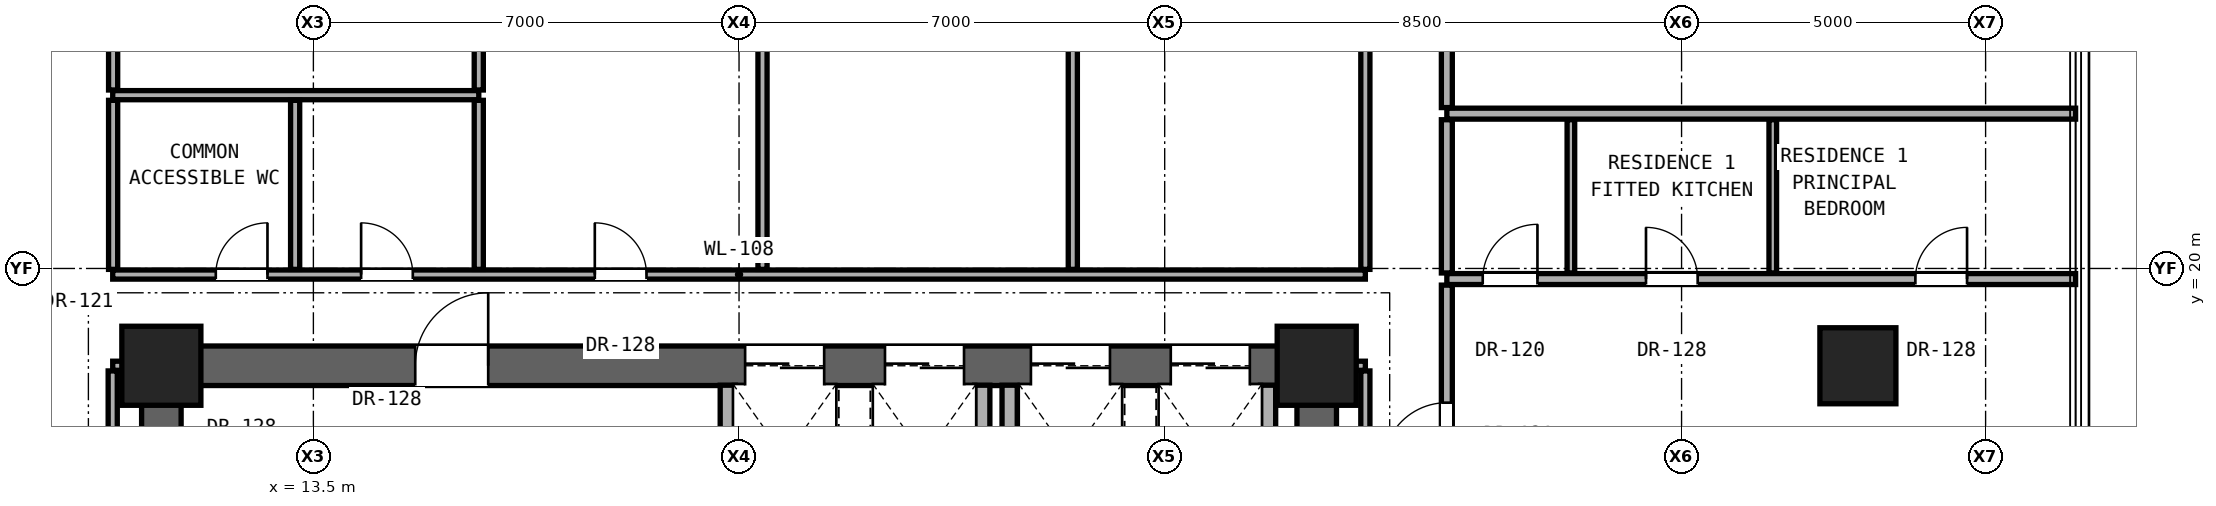
"""IFC4 building model, lengths in metres.
Left out: names, types, materials, properties, quantities, classifications, styles, units other than length and angle.
Written with IfcOpenShell. Run it as: python <this file> out.ifc"""

import sys

from ifc_helpers import new_model, si_unit, direction, frame, frame_2d, origin, origin_2d, place, context, subcontext, project, spatial, rectangle, hollow_rectangle, extrude, element, fill, save


model = new_model("IFC4")
c1 = context("Model", 3, precision=1e-05, world=origin(), true_north=direction((0.0, 1.0)))
c2 = subcontext(c1, "Body", "Model", "MODEL_VIEW")
j1 = project(units=[si_unit("LENGTHUNIT", "METRE"), si_unit("PLANEANGLEUNIT", "RADIAN")], contexts=[c1])
p1 = place(None, origin())
s1 = spatial("IfcSite", under=j1, at=p1, CompositionType="ELEMENT")
p2 = place(p1, origin())
s2 = spatial("IfcBuilding", under=s1, at=p2, CompositionType="ELEMENT")
p3 = place(p2, frame((0.0, 0.0, 68.6)))
s3 = spatial("IfcBuildingStorey", under=s2, at=p3, CompositionType="ELEMENT", Elevation=68.6)
for number, where, z_axis, x_axis in (
    (1, (11.0, 18.4, 0.0), (0.0, 0.0, 1.0), (1.0, 0.0, 0.0)),
    (2, (30.0, 18.4, 0.0), (0.0, 0.0, 1.0), (1.0, 0.0, 0.0)),
):
    element("IfcColumn", number, at=place(p3, frame(where, z_axis=z_axis, x_axis=x_axis)), inside=s3, PredefinedType="COLUMN", context=c2, shape_type="SweptSolid", body=[
        extrude(rectangle(XDim=1.3, YDim=1.3, at=origin_2d()), origin(), (0.0, 0.0, 1.0), 3.3),
    ])
p4 = place(p3, frame((38.9, 18.4, 0.0), z_axis=(0.0, 0.0, 1.0), x_axis=(1.0, 0.0, 0.0)))
e3 = element("IfcColumn", 3, at=p4, inside=s3, PredefinedType="COLUMN", context=c2, shape_type="SweptSolid", body=[
    extrude(hollow_rectangle(XDim=1.25, YDim=1.25, WallThickness=0.07, at=origin_2d()), origin(), (0.0, 0.0, 1.0), 3.3),
])
for number, where, z_axis, x_axis in (
    (4, (11.0, 12.4, 0.0), (0.0, 0.0, 1.0), (0.0, 1.0, 0.0)),
    (5, (30.0, 12.4, 0.0), (0.0, 0.0, 1.0), (0.0, 1.0, 0.0)),
):
    element("IfcWall", number, at=place(p3, frame(where, z_axis=z_axis, x_axis=x_axis)), inside=s3, PredefinedType="SHEAR", context=c2, shape_type="SweptSolid", body=[
        extrude(rectangle(XDim=6.0, YDim=0.65, at=frame_2d((3.0, 0.0))), origin(), (0.0, 0.0, 1.0), 3.06),
    ])
p5 = place(p3, frame((11.0, 18.4, 0.0), z_axis=(0.0, 0.0, 1.0), x_axis=(1.0, 0.0, 0.0)))
e6 = element("IfcWall", 6, at=p5, inside=s3, PredefinedType="SHEAR", context=c2, shape_type="SweptSolid", body=[
    extrude(rectangle(XDim=19.0, YDim=0.65, at=frame_2d((9.5, 0.0))), origin(), (0.0, 0.0, 1.0), 3.06),
])
p6 = place(p5, frame((4.175, 0.0, 0.0)))
e7 = element("IfcOpeningElement", 7, at=p6, cuts=e6, PredefinedType="OPENING", context=c2, shape_type="SweptSolid", body=[
    extrude(rectangle(XDim=1.2, YDim=2.25, at=frame_2d((0.6, 1.125))), frame((0.0, 0.335, 0.0), z_axis=(0.0, -1.0, 0.0), x_axis=(1.0, 0.0, 0.0)), (0.0, 0.0, 1.0), 0.67),
])
p7 = place(p5, frame((9.6, 0.0, 0.0)))
e8 = element("IfcOpeningElement", 8, at=p7, cuts=e6, PredefinedType="OPENING", context=c2, shape_type="SweptSolid", body=[
    extrude(rectangle(XDim=1.3, YDim=2.3, at=frame_2d((0.65, 1.15))), frame((0.0, 0.335, 0.0), z_axis=(0.0, -1.0, 0.0), x_axis=(1.0, 0.0, 0.0)), (0.0, 0.0, 1.0), 0.67),
])
p8 = place(p5, frame((11.9, 0.0, 0.0)))
e9 = element("IfcOpeningElement", 9, at=p8, cuts=e6, PredefinedType="OPENING", context=c2, shape_type="SweptSolid", body=[
    extrude(rectangle(XDim=1.3, YDim=2.3, at=frame_2d((0.65, 1.15))), frame((0.0, 0.335, 0.0), z_axis=(0.0, -1.0, 0.0), x_axis=(1.0, 0.0, 0.0)), (0.0, 0.0, 1.0), 0.67),
])
p9 = place(p5, frame((14.3, 0.0, 0.0)))
e10 = element("IfcOpeningElement", 10, at=p9, cuts=e6, PredefinedType="OPENING", context=c2, shape_type="SweptSolid", body=[
    extrude(rectangle(XDim=1.3, YDim=2.3, at=frame_2d((0.65, 1.15))), frame((0.0, 0.335, 0.0), z_axis=(0.0, -1.0, 0.0), x_axis=(1.0, 0.0, 0.0)), (0.0, 0.0, 1.0), 0.67),
])
p10 = place(p5, frame((16.6, 0.0, 0.0)))
e11 = element("IfcOpeningElement", 11, at=p10, cuts=e6, PredefinedType="OPENING", context=c2, shape_type="SweptSolid", body=[
    extrude(rectangle(XDim=1.3, YDim=2.3, at=frame_2d((0.65, 1.15))), frame((0.0, 0.335, 0.0), z_axis=(0.0, -1.0, 0.0), x_axis=(1.0, 0.0, 0.0)), (0.0, 0.0, 1.0), 0.67),
])
for number, where, z_axis, x_axis in (
    (12, (10.2, 18.4, 0.0), (0.0, 0.0, 1.0), (1.0, 0.0, 0.0)),
    (13, (30.32, 18.4, 0.0), (0.0, 0.0, 1.0), (1.0, 0.0, 0.0)),
):
    element("IfcWall", number, at=place(p3, frame(where, z_axis=z_axis, x_axis=x_axis)), inside=s3, PredefinedType="PARTITIONING", context=c2, shape_type="SweptSolid", body=[
        extrude(rectangle(XDim=0.48, YDim=0.15, at=frame_2d((0.24, 0.0))), origin(), (0.0, 0.0, 1.0), 2.436),
    ])
p11 = place(p3, frame((10.2, 19.9, 0.0), z_axis=(0.0, 0.0, 1.0), x_axis=(1.0, 0.0, 0.0)))
e14 = element("IfcWall", 14, at=p11, inside=s3, PredefinedType="PARTITIONING", context=c2, shape_type="SweptSolid", body=[
    extrude(rectangle(XDim=20.6, YDim=0.15, at=frame_2d((10.3, 0.0))), origin(), (0.0, 0.0, 1.0), 2.104),
])
p12 = place(p11, frame((1.695, 0.0, 0.0)))
e15 = element("IfcOpeningElement", 15, at=p12, cuts=e14, PredefinedType="OPENING", context=c2, shape_type="SweptSolid", body=[
    extrude(rectangle(XDim=0.85, YDim=2.01, at=frame_2d((0.425, 1.005))), frame((0.0, 0.085, 0.0), z_axis=(0.0, -1.0, 0.0), x_axis=(1.0, 0.0, 0.0)), (0.0, 0.0, 1.0), 0.17),
])
p13 = place(p11, frame((4.085, 0.0, 0.0)))
e16 = element("IfcOpeningElement", 16, at=p13, cuts=e14, PredefinedType="OPENING", context=c2, shape_type="SweptSolid", body=[
    extrude(rectangle(XDim=0.85, YDim=2.01, at=frame_2d((0.425, 1.005))), frame((0.0, 0.085, 0.0), z_axis=(0.0, -1.0, 0.0), x_axis=(1.0, 0.0, 0.0)), (0.0, 0.0, 1.0), 0.17),
])
p14 = place(p11, frame((7.928, 0.0, 0.0)))
e17 = element("IfcOpeningElement", 17, at=p14, cuts=e14, PredefinedType="OPENING", context=c2, shape_type="SweptSolid", body=[
    extrude(rectangle(XDim=0.85, YDim=2.01, at=frame_2d((0.425, 1.005))), frame((0.0, 0.085, 0.0), z_axis=(0.0, -1.0, 0.0), x_axis=(1.0, 0.0, 0.0)), (0.0, 0.0, 1.0), 0.17),
])
p15 = place(p3, frame((32.14, 19.826, 0.0), z_axis=(0.0, 0.0, 1.0), x_axis=(1.0, 0.0, 0.0)))
e18 = element("IfcWall", 18, at=p15, inside=s3, PredefinedType="PARTITIONING", context=c2, shape_type="SweptSolid", body=[
    extrude(rectangle(XDim=10.34, YDim=0.18, at=frame_2d((5.17, 0.0))), origin(), (0.0, 0.0, 1.0), 2.125),
])
p16 = place(p15, frame((7.705, 0.0, 0.0)))
e19 = element("IfcOpeningElement", 19, at=p16, cuts=e18, PredefinedType="OPENING", context=c2, shape_type="SweptSolid", body=[
    extrude(rectangle(XDim=0.85, YDim=2.01, at=frame_2d((0.425, 1.005))), frame((0.0, 0.1, 0.0), z_axis=(0.0, -1.0, 0.0), x_axis=(1.0, 0.0, 0.0)), (0.0, 0.0, 1.0), 0.2),
])
p17 = place(p15, frame((3.275, 0.0, 0.0)))
e20 = element("IfcOpeningElement", 20, at=p17, cuts=e18, PredefinedType="OPENING", context=c2, shape_type="SweptSolid", body=[
    extrude(rectangle(XDim=0.85, YDim=2.01, at=frame_2d((0.425, 1.005))), frame((0.0, 0.1, 0.0), z_axis=(0.0, -1.0, 0.0), x_axis=(1.0, 0.0, 0.0)), (0.0, 0.0, 1.0), 0.2),
])
p18 = place(p15, frame((0.59, 0.0, 0.0)))
e21 = element("IfcOpeningElement", 21, at=p18, cuts=e18, PredefinedType="OPENING", context=c2, shape_type="SweptSolid", body=[
    extrude(rectangle(XDim=0.9, YDim=2.1, at=frame_2d((0.45, 1.05))), frame((0.0, 0.1, 0.0), z_axis=(0.0, -1.0, 0.0), x_axis=(1.0, 0.0, 0.0)), (0.0, 0.0, 1.0), 0.2),
])
p19 = place(p3, frame((32.14, 22.546, 0.0), z_axis=(0.0, 0.0, 1.0), x_axis=(1.0, 0.0, 0.0)))
e22 = element("IfcWall", 22, at=p19, inside=s3, PredefinedType="PARTITIONING", context=c2, shape_type="SweptSolid", body=[
    extrude(rectangle(XDim=10.34, YDim=0.18, at=frame_2d((5.17, 0.0))), origin(), (0.0, 0.0, 1.0), 2.125),
])
p20 = place(p3, frame((10.2, 22.85, 0.0), z_axis=(0.0, 0.0, 1.0), x_axis=(1.0, 0.0, 0.0)))
e23 = element("IfcWall", 23, at=p20, inside=s3, PredefinedType="PARTITIONING", context=c2, shape_type="SweptSolid", body=[
    extrude(rectangle(XDim=6.02, YDim=0.15, at=frame_2d((3.01, 0.0))), origin(), (0.0, 0.0, 1.0), 2.104),
])
p21 = place(p3, frame((10.2, 12.335, 0.0), z_axis=(0.0, 0.0, 1.0), x_axis=(0.0, 1.0, 0.0)))
e24 = element("IfcWall", 24, at=p21, inside=s3, PredefinedType="PARTITIONING", context=c2, shape_type="SweptSolid", body=[
    extrude(rectangle(XDim=5.98, YDim=0.15, at=frame_2d((2.99, 0.0))), origin(), (0.0, 0.0, 1.0), 2.436),
])
p22 = place(p3, frame((10.207, 19.985, 0.0), z_axis=(0.0, 0.0, 1.0), x_axis=(0.0, 1.0, 0.0)))
e25 = element("IfcWall", 25, at=p22, inside=s3, PredefinedType="PARTITIONING", context=c2, shape_type="SweptSolid", body=[
    extrude(rectangle(XDim=2.78, YDim=0.15, at=frame_2d((1.39, 0.0))), origin(), (0.0, 0.0, 1.0), 3.06),
])
p23 = place(p3, frame((10.207, 22.935, 0.0), z_axis=(0.0, 0.0, 1.0), x_axis=(0.0, 1.0, 0.0)))
e26 = element("IfcWall", 26, at=p23, inside=s3, PredefinedType="PARTITIONING", context=c2, shape_type="SweptSolid", body=[
    extrude(rectangle(XDim=10.08, YDim=0.15, at=frame_2d((5.04, 0.0))), origin(), (0.0, 0.0, 1.0), 2.279),
])
p24 = place(p23, frame((4.565, 0.0, 0.0)))
e27 = element("IfcOpeningElement", 27, at=p24, cuts=e26, PredefinedType="OPENING", context=c2, shape_type="SweptSolid", body=[
    extrude(rectangle(XDim=0.95, YDim=2.15, at=frame_2d((0.475, 1.075))), frame((0.0, 0.085, 0.0), z_axis=(0.0, -1.0, 0.0), x_axis=(1.0, 0.0, 0.0)), (0.0, 0.0, 1.0), 0.17),
])
for number, where, z_axis, x_axis in (
    (28, (13.2, 19.985, 0.0), (0.0, 0.0, 1.0), (0.0, 1.0, 0.0)),
    (29, (16.22, 19.985, 0.0), (0.0, 0.0, 1.0), (0.0, 1.0, 0.0)),
):
    element("IfcWall", number, at=place(p3, frame(where, z_axis=z_axis, x_axis=x_axis)), inside=s3, PredefinedType="PARTITIONING", context=c2, shape_type="SweptSolid", body=[
        extrude(rectangle(XDim=2.78, YDim=0.15, at=frame_2d((1.39, 0.0))), origin(), (0.0, 0.0, 1.0), 3.06),
    ])
p25 = place(p3, frame((16.22, 22.935, 0.0), z_axis=(0.0, 0.0, 1.0), x_axis=(0.0, 1.0, 0.0)))
e30 = element("IfcWall", 30, at=p25, inside=s3, PredefinedType="PARTITIONING", context=c2, shape_type="SweptSolid", body=[
    extrude(rectangle(XDim=10.08, YDim=0.15, at=frame_2d((5.04, 0.0))), origin(), (0.0, 0.0, 1.0), 2.104),
])
p26 = place(p3, frame((20.315, 16.555, 0.0), z_axis=(0.0, 0.0, 1.0), x_axis=(0.0, 1.0, 0.0)))
e31 = element("IfcWall", 31, at=p26, inside=s3, PredefinedType="SOLIDWALL", context=c2, shape_type="SweptSolid", body=[
    extrude(rectangle(XDim=1.525, YDim=0.25, at=frame_2d((0.763, 0.0))), origin(), (0.0, 0.0, 1.0), 3.06),
])
p27 = place(p3, frame((20.886, 19.985, 0.0), z_axis=(0.0, 0.0, 1.0), x_axis=(0.0, 1.0, 0.0)))
e32 = element("IfcWall", 32, at=p27, inside=s3, PredefinedType="PARTITIONING", context=c2, shape_type="SweptSolid", body=[
    extrude(rectangle(XDim=13.03, YDim=0.15, at=frame_2d((6.515, 0.0))), origin(), (0.0, 0.0, 1.0), 2.104),
])
for number, where, z_axis, x_axis in (
    (33, (24.5, 15.785, 0.0), (0.0, 0.0, 1.0), (0.0, 1.0, 0.0)),
    (34, (24.95, 15.785, 0.0), (0.0, 0.0, 1.0), (0.0, 1.0, 0.0)),
):
    element("IfcWall", number, at=place(p3, frame(where, z_axis=z_axis, x_axis=x_axis)), inside=s3, PredefinedType="SOLIDWALL", context=c2, shape_type="SweptSolid", body=[
        extrude(rectangle(XDim=2.295, YDim=0.25, at=frame_2d((1.147, 0.0))), origin(), (0.0, 0.0, 1.0), 3.06),
    ])
p28 = place(p3, frame((25.989, 19.985, 0.0), z_axis=(0.0, 0.0, 1.0), x_axis=(0.0, 1.0, 0.0)))
e35 = element("IfcWall", 35, at=p28, inside=s3, PredefinedType="PARTITIONING", context=c2, shape_type="SweptSolid", body=[
    extrude(rectangle(XDim=13.03, YDim=0.15, at=frame_2d((6.515, 0.0))), origin(), (0.0, 0.0, 1.0), 2.104),
])
p29 = place(p3, frame((29.2, 15.785, 0.0), z_axis=(0.0, 0.0, 1.0), x_axis=(0.0, 1.0, 0.0)))
e36 = element("IfcWall", 36, at=p29, inside=s3, PredefinedType="SOLIDWALL", context=c2, shape_type="SweptSolid", body=[
    extrude(rectangle(XDim=2.295, YDim=0.25, at=frame_2d((1.147, 0.0))), origin(), (0.0, 0.0, 1.0), 3.06),
])
p30 = place(p3, frame((30.8, 12.335, 0.0), z_axis=(0.0, 0.0, 1.0), x_axis=(0.0, 1.0, 0.0)))
e37 = element("IfcWall", 37, at=p30, inside=s3, PredefinedType="PARTITIONING", context=c2, shape_type="SweptSolid", body=[
    extrude(rectangle(XDim=5.98, YDim=0.15, at=frame_2d((2.99, 0.0))), origin(), (0.0, 0.0, 1.0), 2.436),
])
p31 = place(p3, frame((30.8, 19.985, 0.0), z_axis=(0.0, 0.0, 1.0), x_axis=(0.0, 1.0, 0.0)))
e38 = element("IfcWall", 38, at=p31, inside=s3, PredefinedType="PARTITIONING", context=c2, shape_type="SweptSolid", body=[
    extrude(rectangle(XDim=13.03, YDim=0.15, at=frame_2d((6.515, 0.0))), origin(), (0.0, 0.0, 1.0), 2.279),
])
p32 = place(p3, frame((32.14, 14.21, 0.0), z_axis=(0.0, 0.0, 1.0), x_axis=(0.0, 1.0, 0.0)))
e39 = element("IfcWall", 39, at=p32, inside=s3, PredefinedType="PARTITIONING", context=c2, shape_type="SweptSolid", body=[
    extrude(rectangle(XDim=5.516, YDim=0.18, at=frame_2d((2.758, 0.0))), origin(), (0.0, 0.0, 1.0), 2.436),
])
p33 = place(p32, frame((2.533, 0.0, 0.0)))
e40 = element("IfcOpeningElement", 40, at=p33, cuts=e39, PredefinedType="OPENING", context=c2, shape_type="SweptSolid", body=[
    extrude(rectangle(XDim=1.05, YDim=2.2, at=frame_2d((0.525, 1.1))), frame((0.0, 0.1, 0.0), z_axis=(0.0, -1.0, 0.0), x_axis=(1.0, 0.0, 0.0)), (0.0, 0.0, 1.0), 0.2),
])
p34 = place(p3, frame((32.14, 19.926, 0.0), z_axis=(0.0, 0.0, 1.0), x_axis=(0.0, 1.0, 0.0)))
e41 = element("IfcWall", 41, at=p34, inside=s3, PredefinedType="PARTITIONING", context=c2, shape_type="SweptSolid", body=[
    extrude(rectangle(XDim=2.52, YDim=0.18, at=frame_2d((1.26, 0.0))), origin(), (0.0, 0.0, 1.0), 3.06),
])
p35 = place(p3, frame((32.14, 22.646, 0.0), z_axis=(0.0, 0.0, 1.0), x_axis=(0.0, 1.0, 0.0)))
e42 = element("IfcWall", 42, at=p35, inside=s3, PredefinedType="PARTITIONING", context=c2, shape_type="SweptSolid", body=[
    extrude(rectangle(XDim=4.902, YDim=0.18, at=frame_2d((2.451, 0.0))), origin(), (0.0, 0.0, 1.0), 2.279),
])
p36 = place(p35, frame((1.926, 0.0, 0.0)))
e43 = element("IfcOpeningElement", 43, at=p36, cuts=e42, PredefinedType="OPENING", context=c2, shape_type="SweptSolid", body=[
    extrude(rectangle(XDim=1.05, YDim=2.2, at=frame_2d((0.525, 1.1))), frame((0.0, 0.1, 0.0), z_axis=(0.0, -1.0, 0.0), x_axis=(1.0, 0.0, 0.0)), (0.0, 0.0, 1.0), 0.2),
])
for number, where, z_axis, x_axis in (
    (44, (34.18, 19.926, 0.0), (0.0, 0.0, 1.0), (0.0, 1.0, 0.0)),
    (45, (37.5, 19.926, 0.0), (0.0, 0.0, 1.0), (0.0, 1.0, 0.0)),
):
    element("IfcWall", number, at=place(p3, frame(where, z_axis=z_axis, x_axis=x_axis)), inside=s3, PredefinedType="PARTITIONING", context=c2, shape_type="SweptSolid", body=[
        extrude(rectangle(XDim=2.52, YDim=0.125, at=frame_2d((1.26, 0.0))), origin(), (0.0, 0.0, 1.0), 3.06),
    ])
p37 = place(p6, origin())
e46 = element("IfcDoor", 46, at=p37, inside=s3, OperationType="SINGLE_SWING_RIGHT", PredefinedType="DOOR", context=c2, shape_type="SweptSolid", body=[
    extrude(rectangle(XDim=1.2, YDim=2.25, at=frame_2d((0.6, 1.125))), frame((0.0, 0.025, 0.0), z_axis=(0.0, -1.0, 0.0), x_axis=(1.0, 0.0, 0.0)), (0.0, 0.0, 1.0), 0.05),
])
fill(e7, e46)
p38 = place(p12, origin())
e47 = element("IfcDoor", 47, at=p38, inside=s3, OperationType="SINGLE_SWING_RIGHT", PredefinedType="DOOR", context=c2, shape_type="SweptSolid", body=[
    extrude(rectangle(XDim=0.85, YDim=2.01, at=frame_2d((0.425, 1.005))), frame((0.0, 0.025, 0.0), z_axis=(0.0, -1.0, 0.0), x_axis=(1.0, 0.0, 0.0)), (0.0, 0.0, 1.0), 0.05),
])
fill(e15, e47)
p39 = place(p33, origin())
e48 = element("IfcDoor", 48, at=p39, inside=s3, OperationType="SINGLE_SWING_LEFT", PredefinedType="DOOR", context=c2, shape_type="SweptSolid", body=[
    extrude(rectangle(XDim=1.05, YDim=2.2, at=frame_2d((0.525, 1.1))), frame((0.0, 0.025, 0.0), z_axis=(0.0, -1.0, 0.0), x_axis=(1.0, 0.0, 0.0)), (0.0, 0.0, 1.0), 0.05),
])
fill(e40, e48)
p40 = place(p16, origin())
e49 = element("IfcDoor", 49, at=p40, inside=s3, OperationType="SINGLE_SWING_RIGHT", PredefinedType="DOOR", context=c2, shape_type="SweptSolid", body=[
    extrude(rectangle(XDim=0.85, YDim=2.01, at=frame_2d((0.425, 1.005))), frame((0.0, 0.025, 0.0), z_axis=(0.0, -1.0, 0.0), x_axis=(1.0, 0.0, 0.0)), (0.0, 0.0, 1.0), 0.05),
])
fill(e19, e49)
p41 = place(p17, origin())
e50 = element("IfcDoor", 50, at=p41, inside=s3, OperationType="SINGLE_SWING_LEFT", PredefinedType="DOOR", context=c2, shape_type="SweptSolid", body=[
    extrude(rectangle(XDim=0.85, YDim=2.01, at=frame_2d((0.425, 1.005))), frame((0.0, 0.025, 0.0), z_axis=(0.0, -1.0, 0.0), x_axis=(1.0, 0.0, 0.0)), (0.0, 0.0, 1.0), 0.05),
])
fill(e20, e50)
p42 = place(p18, origin())
e51 = element("IfcDoor", 51, at=p42, inside=s3, OperationType="SINGLE_SWING_RIGHT", PredefinedType="DOOR", context=c2, shape_type="SweptSolid", body=[
    extrude(rectangle(XDim=0.9, YDim=2.1, at=frame_2d((0.45, 1.05))), frame((0.0, 0.025, 0.0), z_axis=(0.0, -1.0, 0.0), x_axis=(1.0, 0.0, 0.0)), (0.0, 0.0, 1.0), 0.05),
])
fill(e21, e51)
p43 = place(p13, origin())
e52 = element("IfcDoor", 52, at=p43, inside=s3, OperationType="SINGLE_SWING_LEFT", PredefinedType="DOOR", context=c2, shape_type="SweptSolid", body=[
    extrude(rectangle(XDim=0.85, YDim=2.01, at=frame_2d((0.425, 1.005))), frame((0.0, 0.025, 0.0), z_axis=(0.0, -1.0, 0.0), x_axis=(1.0, 0.0, 0.0)), (0.0, 0.0, 1.0), 0.05),
])
fill(e16, e52)
p44 = place(p14, origin())
e53 = element("IfcDoor", 53, at=p44, inside=s3, OperationType="SINGLE_SWING_LEFT", PredefinedType="DOOR", context=c2, shape_type="SweptSolid", body=[
    extrude(rectangle(XDim=0.85, YDim=2.01, at=frame_2d((0.425, 1.005))), frame((0.0, 0.025, 0.0), z_axis=(0.0, -1.0, 0.0), x_axis=(1.0, 0.0, 0.0)), (0.0, 0.0, 1.0), 0.05),
])
fill(e17, e53)
p45 = place(p7, origin())
e54 = element("IfcDoor", 54, at=p45, inside=s3, OperationType="DOUBLE_DOOR_SLIDING", PredefinedType="DOOR", context=c2, shape_type="SweptSolid", body=[
    extrude(rectangle(XDim=1.3, YDim=2.3, at=frame_2d((0.65, 1.15))), frame((0.0, 0.025, 0.0), z_axis=(0.0, -1.0, 0.0), x_axis=(1.0, 0.0, 0.0)), (0.0, 0.0, 1.0), 0.05),
])
fill(e8, e54)
p46 = place(p8, origin())
e55 = element("IfcDoor", 55, at=p46, inside=s3, OperationType="DOUBLE_DOOR_SLIDING", PredefinedType="DOOR", context=c2, shape_type="SweptSolid", body=[
    extrude(rectangle(XDim=1.3, YDim=2.3, at=frame_2d((0.65, 1.15))), frame((0.0, 0.025, 0.0), z_axis=(0.0, -1.0, 0.0), x_axis=(1.0, 0.0, 0.0)), (0.0, 0.0, 1.0), 0.05),
])
fill(e9, e55)
p47 = place(p9, origin())
e56 = element("IfcDoor", 56, at=p47, inside=s3, OperationType="DOUBLE_DOOR_SLIDING", PredefinedType="DOOR", context=c2, shape_type="SweptSolid", body=[
    extrude(rectangle(XDim=1.3, YDim=2.3, at=frame_2d((0.65, 1.15))), frame((0.0, 0.025, 0.0), z_axis=(0.0, -1.0, 0.0), x_axis=(1.0, 0.0, 0.0)), (0.0, 0.0, 1.0), 0.05),
])
fill(e10, e56)
p48 = place(p10, origin())
e57 = element("IfcDoor", 57, at=p48, inside=s3, OperationType="DOUBLE_DOOR_SLIDING", PredefinedType="DOOR", context=c2, shape_type="SweptSolid", body=[
    extrude(rectangle(XDim=1.3, YDim=2.3, at=frame_2d((0.65, 1.15))), frame((0.0, 0.025, 0.0), z_axis=(0.0, -1.0, 0.0), x_axis=(1.0, 0.0, 0.0)), (0.0, 0.0, 1.0), 0.05),
])
fill(e11, e57)
save(model, sys.argv[1])
